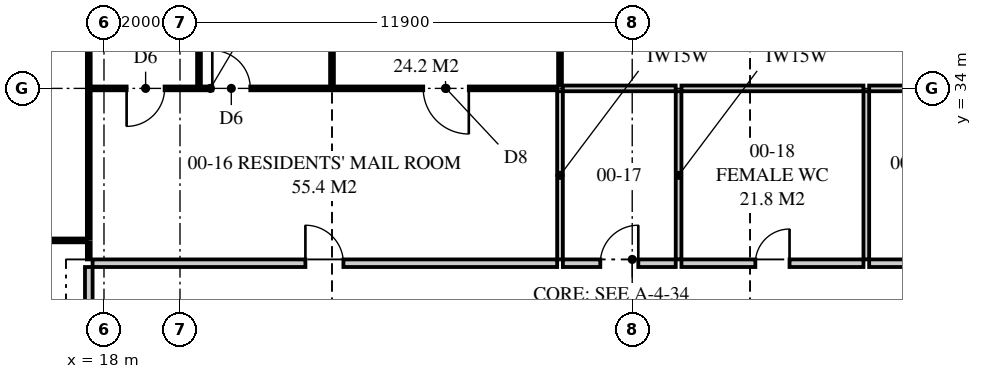
"""IFC4 building model, lengths in metres.
Left out: names, types, materials, properties, quantities, classifications, styles, units other than length and angle.
Written with IfcOpenShell. Run it as: python <this file> out.ifc"""

import sys

from ifc_helpers import new_model, si_unit, direction, frame, frame_2d, origin, place, context, subcontext, project, spatial, polyline, rectangle, outline, extrude, element, fill, save


model = new_model("IFC4")
c1 = context("Model", 3, precision=1e-05, world=origin(), true_north=direction((0.0, 1.0)))
c2 = subcontext(c1, "Body", "Model", "MODEL_VIEW")
j1 = project(units=[si_unit("LENGTHUNIT", "METRE"), si_unit("PLANEANGLEUNIT", "RADIAN")], contexts=[c1])
p1 = place(None, origin())
s1 = spatial("IfcSite", under=j1, at=p1, CompositionType="ELEMENT")
p2 = place(p1, origin())
s2 = spatial("IfcBuilding", under=s1, at=p2, CompositionType="ELEMENT")
p3 = place(p2, origin())
s3 = spatial("IfcBuildingStorey", under=s2, at=p3, CompositionType="ELEMENT", Elevation=0.0)
p4 = place(p3, frame((9.55, 30.0, 0.0), z_axis=(0.0, 0.0, 1.0), x_axis=(1.0, 0.0, 0.0)))
e1 = element("IfcWall", 1, at=p4, inside=s3, PredefinedType="PARTITIONING", context=c2, shape_type="SweptSolid", body=[
    extrude(outline(polyline([(0.0, 0.0), (8.0, 0.0), (8.0, 5.72), (4.71, 5.72), (4.71, 5.12), (2.19, 5.12), (2.19, 5.72), (0.0, 5.72), (0.0, 0.0)])), frame((0.0, 0.05, 0.0), z_axis=(0.0, -1.0, 0.0), x_axis=(1.0, 0.0, 0.0)), (0.0, 0.0, 1.0), 0.1),
])
p5 = place(p4, frame((3.5, 0.0, 0.0)))
e2 = element("IfcOpeningElement", 2, at=p5, cuts=e1, PredefinedType="OPENING", context=c2, shape_type="SweptSolid", body=[
    extrude(rectangle(XDim=1.2, YDim=2.2, at=frame_2d((0.6, 1.1))), frame((0.0, 0.06, 0.0), z_axis=(0.0, -1.0, 0.0), x_axis=(1.0, 0.0, 0.0)), (0.0, 0.0, 1.0), 0.12),
])
p6 = place(p3, frame((17.6, 27.75, 0.0), z_axis=(0.0, 0.0, 1.0), x_axis=(0.0, 1.0, 0.0)))
e3 = element("IfcWall", 3, at=p6, inside=s3, PredefinedType="PARTITIONING", context=c2, shape_type="SweptSolid", body=[
    extrude(rectangle(XDim=1.55, YDim=0.2, at=frame_2d((0.775, 0.0))), origin(), (0.0, 0.0, 1.0), 5.72),
])
p7 = place(p3, frame((17.6, 29.5, 0.0), z_axis=(0.0, 0.0, 1.0), x_axis=(0.0, 1.0, 0.0)))
e4 = element("IfcWall", 4, at=p7, inside=s3, PredefinedType="PARTITIONING", context=c2, shape_type="SweptSolid", body=[
    extrude(rectangle(XDim=0.45, YDim=0.1, at=frame_2d((0.225, 0.0))), origin(), (0.0, 0.0, 1.0), 5.72),
])
p8 = place(p3, frame((17.6, 30.05, 0.0), z_axis=(0.0, 0.0, 1.0), x_axis=(0.0, 1.0, 0.0)))
e5 = element("IfcWall", 5, at=p8, inside=s3, PredefinedType="PARTITIONING", context=c2, shape_type="SweptSolid", body=[
    extrude(rectangle(XDim=3.9, YDim=0.1, at=frame_2d((1.95, 0.0))), origin(), (0.0, 0.0, 1.0), 5.72),
])
p9 = place(p3, frame((17.6, 34.05, 0.0), z_axis=(0.0, 0.0, 1.0), x_axis=(0.0, 1.0, 0.0)))
e6 = element("IfcWall", 6, at=p9, inside=s3, PredefinedType="PARTITIONING", context=c2, shape_type="SweptSolid", body=[
    extrude(outline(polyline([(0.0, 0.0), (1.9, 0.0), (1.9, 5.72), (1.9, 5.12), (1.74, 5.12), (1.74, 5.72), (0.0, 5.72), (0.0, 0.0)])), frame((0.0, 0.05, 0.0), z_axis=(0.0, -1.0, 0.0), x_axis=(1.0, 0.0, 0.0)), (0.0, 0.0, 1.0), 0.1),
])
p10 = place(p3, frame((17.7, 29.4, 0.0), z_axis=(0.0, 0.0, 1.0), x_axis=(1.0, 0.0, 0.0)))
e7 = element("IfcWall", 7, at=p10, inside=s3, PredefinedType="PARTITIONING", context=c2, shape_type="SweptSolid", body=[
    extrude(outline(polyline([(0.0, 0.0), (12.225, 0.0), (12.225, 5.72), (7.61, 5.72), (7.61, 5.12), (4.99, 5.12), (4.99, 5.72), (0.0, 5.72), (0.0, 0.0)])), frame((0.0, 0.1, 0.0), z_axis=(0.0, -1.0, 0.0), x_axis=(1.0, 0.0, 0.0)), (0.0, 0.0, 1.0), 0.2),
])
p11 = place(p10, frame((5.6, 0.0, 0.0)))
e8 = element("IfcOpeningElement", 8, at=p11, cuts=e7, PredefinedType="OPENING", context=c2, shape_type="SweptSolid", body=[
    extrude(rectangle(XDim=1.0, YDim=2.1, at=frame_2d((0.5, 1.05))), frame((0.0, 0.11, 0.0), z_axis=(0.0, -1.0, 0.0), x_axis=(1.0, 0.0, 0.0)), (0.0, 0.0, 1.0), 0.22),
])
p12 = place(p3, frame((30.075, 29.4, 0.0), z_axis=(0.0, 0.0, 1.0), x_axis=(1.0, 0.0, 0.0)))
e9 = element("IfcWall", 9, at=p12, inside=s3, PredefinedType="PARTITIONING", context=c2, shape_type="SweptSolid", body=[
    extrude(rectangle(XDim=2.97, YDim=0.2, at=frame_2d((1.485, 0.0))), origin(), (0.0, 0.0, 1.0), 5.72),
])
p13 = place(p12, frame((0.985, 0.0, 0.0)))
e10 = element("IfcOpeningElement", 10, at=p13, cuts=e9, PredefinedType="OPENING", context=c2, shape_type="SweptSolid", body=[
    extrude(rectangle(XDim=1.0, YDim=2.1, at=frame_2d((0.5, 1.05))), frame((0.0, 0.11, 0.0), z_axis=(0.0, -1.0, 0.0), x_axis=(1.0, 0.0, 0.0)), (0.0, 0.0, 1.0), 0.22),
])
p14 = place(p3, frame((33.195, 29.4, 0.0), z_axis=(0.0, 0.0, 1.0), x_axis=(1.0, 0.0, 0.0)))
e11 = element("IfcWall", 11, at=p14, inside=s3, PredefinedType="PARTITIONING", context=c2, shape_type="SweptSolid", body=[
    extrude(outline(polyline([(0.0, 0.0), (4.79, 0.0), (4.79, 5.72), (3.115, 5.72), (3.115, 5.12), (0.495, 5.12), (0.495, 5.72), (0.0, 5.72), (0.0, 0.0)])), frame((0.0, 0.1, 0.0), z_axis=(0.0, -1.0, 0.0), x_axis=(1.0, 0.0, 0.0)), (0.0, 0.0, 1.0), 0.2),
])
p15 = place(p14, frame((1.945, 0.0, 0.0)))
e12 = element("IfcOpeningElement", 12, at=p15, cuts=e11, PredefinedType="OPENING", context=c2, shape_type="SweptSolid", body=[
    extrude(rectangle(XDim=0.9, YDim=2.1, at=frame_2d((0.45, 1.05))), frame((0.0, 0.11, 0.0), z_axis=(0.0, -1.0, 0.0), x_axis=(1.0, 0.0, 0.0)), (0.0, 0.0, 1.0), 0.22),
])
p16 = place(p3, frame((38.135, 29.4, 0.0), z_axis=(0.0, 0.0, 1.0), x_axis=(1.0, 0.0, 0.0)))
e13 = element("IfcWall", 13, at=p16, inside=s3, PredefinedType="PARTITIONING", context=c2, shape_type="SweptSolid", body=[
    extrude(outline(polyline([(0.0, 0.0), (4.79, 0.0), (4.79, 5.72), (4.79, 5.12), (3.924, 5.12), (3.924, 5.72), (0.0, 5.72), (0.0, 0.0)])), frame((0.0, 0.1, 0.0), z_axis=(0.0, -1.0, 0.0), x_axis=(1.0, 0.0, 0.0)), (0.0, 0.0, 1.0), 0.2),
])
p17 = place(p16, frame((1.945, 0.0, 0.0)))
e14 = element("IfcOpeningElement", 14, at=p17, cuts=e13, PredefinedType="OPENING", context=c2, shape_type="SweptSolid", body=[
    extrude(rectangle(XDim=0.9, YDim=2.1, at=frame_2d((0.45, 1.05))), frame((0.0, 0.11, 0.0), z_axis=(0.0, -1.0, 0.0), x_axis=(1.0, 0.0, 0.0)), (0.0, 0.0, 1.0), 0.22),
])
p18 = place(p3, frame((30.0, 29.5, 0.0), z_axis=(0.0, 0.0, 1.0), x_axis=(0.0, 1.0, 0.0)))
e15 = element("IfcWall", 15, at=p18, inside=s3, PredefinedType="PLUMBINGWALL", context=c2, shape_type="SweptSolid", body=[
    extrude(rectangle(XDim=4.425, YDim=0.15, at=frame_2d((2.212, 0.0))), origin(), (0.0, 0.0, 1.0), 5.72),
])
p19 = place(p3, frame((17.65, 34.0, 0.0), z_axis=(0.0, 0.0, 1.0), x_axis=(1.0, 0.0, 0.0)))
e16 = element("IfcWall", 16, at=p19, inside=s3, PredefinedType="PARTITIONING", context=c2, shape_type="SweptSolid", body=[
    extrude(outline(polyline([(0.0, 0.0), (6.3, 0.0), (6.3, 5.72), (6.3, 5.12), (5.09, 5.12), (5.09, 5.72), (0.0, 5.72), (0.0, 0.0)])), frame((0.0, 0.05, 0.0), z_axis=(0.0, -1.0, 0.0), x_axis=(1.0, 0.0, 0.0)), (0.0, 0.0, 1.0), 0.1),
])
p20 = place(p19, frame((3.2, 0.0, 0.0)))
e17 = element("IfcOpeningElement", 17, at=p20, cuts=e16, PredefinedType="OPENING", context=c2, shape_type="SweptSolid", body=[
    extrude(rectangle(XDim=1.0, YDim=2.1, at=frame_2d((0.5, 1.05))), frame((0.0, 0.06, 0.0), z_axis=(0.0, -1.0, 0.0), x_axis=(1.0, 0.0, 0.0)), (0.0, 0.0, 1.0), 0.12),
])
p21 = place(p19, frame((0.946, 0.0, 0.0)))
e18 = element("IfcOpeningElement", 18, at=p21, cuts=e16, PredefinedType="OPENING", context=c2, shape_type="SweptSolid", body=[
    extrude(rectangle(XDim=1.0, YDim=2.1, at=frame_2d((0.5, 1.05))), frame((0.0, 0.06, 0.0), z_axis=(0.0, -1.0, 0.0), x_axis=(1.0, 0.0, 0.0)), (0.0, 0.0, 1.0), 0.12),
])
p22 = place(p3, frame((24.05, 34.0, 0.0), z_axis=(0.0, 0.0, 1.0), x_axis=(1.0, 0.0, 0.0)))
e19 = element("IfcWall", 19, at=p22, inside=s3, PredefinedType="PARTITIONING", context=c2, shape_type="SweptSolid", body=[
    extrude(outline(polyline([(0.0, 0.0), (5.875, 0.0), (5.875, 5.72), (1.21, 5.72), (1.21, 5.12), (0.0, 5.12), (0.0, 5.72), (0.0, 0.0)])), frame((0.0, 0.05, 0.0), z_axis=(0.0, -1.0, 0.0), x_axis=(1.0, 0.0, 0.0)), (0.0, 0.0, 1.0), 0.1),
])
p23 = place(p22, frame((2.35, 0.0, 0.0)))
e20 = element("IfcOpeningElement", 20, at=p23, cuts=e19, PredefinedType="OPENING", context=c2, shape_type="SweptSolid", body=[
    extrude(rectangle(XDim=1.2, YDim=2.4, at=frame_2d((0.6, 1.2))), frame((0.0, 0.06, 0.0), z_axis=(0.0, -1.0, 0.0), x_axis=(1.0, 0.0, 0.0)), (0.0, 0.0, 1.0), 0.12),
])
p24 = place(p3, frame((33.12, 29.5, 0.0), z_axis=(0.0, 0.0, 1.0), x_axis=(0.0, 1.0, 0.0)))
e21 = element("IfcWall", 21, at=p24, inside=s3, PredefinedType="PLUMBINGWALL", context=c2, shape_type="SweptSolid", body=[
    extrude(rectangle(XDim=4.425, YDim=0.15, at=frame_2d((2.212, 0.0))), origin(), (0.0, 0.0, 1.0), 5.72),
])
p25 = place(p3, frame((30.075, 34.0, 0.0), z_axis=(0.0, 0.0, 1.0), x_axis=(1.0, 0.0, 0.0)))
e22 = element("IfcWall", 22, at=p25, inside=s3, PredefinedType="PLUMBINGWALL", context=c2, shape_type="SweptSolid", body=[
    extrude(rectangle(XDim=2.97, YDim=0.15, at=frame_2d((1.485, 0.0))), origin(), (0.0, 0.0, 1.0), 5.72),
])
p26 = place(p3, frame((38.06, 29.5, 0.0), z_axis=(0.0, 0.0, 1.0), x_axis=(0.0, 1.0, 0.0)))
e23 = element("IfcWall", 23, at=p26, inside=s3, PredefinedType="PLUMBINGWALL", context=c2, shape_type="SweptSolid", body=[
    extrude(rectangle(XDim=4.425, YDim=0.15, at=frame_2d((2.212, 0.0))), origin(), (0.0, 0.0, 1.0), 5.72),
])
p27 = place(p3, frame((33.195, 34.0, 0.0), z_axis=(0.0, 0.0, 1.0), x_axis=(1.0, 0.0, 0.0)))
e24 = element("IfcWall", 24, at=p27, inside=s3, PredefinedType="PLUMBINGWALL", context=c2, shape_type="SweptSolid", body=[
    extrude(outline(polyline([(0.0, 0.0), (4.79, 0.0), (4.79, 5.72), (3.09, 5.72), (3.09, 5.12), (0.52, 5.12), (0.52, 5.72), (0.0, 5.72), (0.0, 0.0)])), frame((0.0, 0.075, 0.0), z_axis=(0.0, -1.0, 0.0), x_axis=(1.0, 0.0, 0.0)), (0.0, 0.0, 1.0), 0.15),
])
p28 = place(p3, frame((38.135, 34.0, 0.0), z_axis=(0.0, 0.0, 1.0), x_axis=(1.0, 0.0, 0.0)))
e25 = element("IfcWall", 25, at=p28, inside=s3, PredefinedType="PLUMBINGWALL", context=c2, shape_type="SweptSolid", body=[
    extrude(outline(polyline([(0.0, 0.0), (4.79, 0.0), (4.79, 5.72), (4.79, 5.12), (3.948, 5.12), (3.948, 5.72), (0.0, 5.72), (0.0, 0.0)])), frame((0.0, 0.075, 0.0), z_axis=(0.0, -1.0, 0.0), x_axis=(1.0, 0.0, 0.0)), (0.0, 0.0, 1.0), 0.15),
])
p29 = place(p3, frame((24.0, 34.05, 0.0), z_axis=(0.0, 0.0, 1.0), x_axis=(0.0, 1.0, 0.0)))
e26 = element("IfcWall", 26, at=p29, inside=s3, PredefinedType="PARTITIONING", context=c2, shape_type="SweptSolid", body=[
    extrude(outline(polyline([(0.0, 0.0), (4.1, 0.0), (4.1, 5.72), (4.1, 5.12), (3.06, 5.12), (0.0, 5.12), (0.0, 5.72), (0.0, 0.0)])), frame((0.0, 0.05, 0.0), z_axis=(0.0, -1.0, 0.0), x_axis=(1.0, 0.0, 0.0)), (0.0, 0.0, 1.0), 0.1),
])
p30 = place(p3, frame((30.0, 34.075, 0.0), z_axis=(0.0, 0.0, 1.0), x_axis=(0.0, 1.0, 0.0)))
e27 = element("IfcWall", 27, at=p30, inside=s3, PredefinedType="PARTITIONING", context=c2, shape_type="SweptSolid", body=[
    extrude(outline(polyline([(0.0, 0.0), (2.975, 0.0), (2.975, 5.12), (1.715, 5.12), (1.715, 5.72), (0.0, 5.72), (0.0, 0.0)])), frame((0.0, 0.05, 0.0), z_axis=(0.0, -1.0, 0.0), x_axis=(1.0, 0.0, 0.0)), (0.0, 0.0, 1.0), 0.1),
])
p31 = place(p30, frame((1.425, 0.0, 0.0)))
e28 = element("IfcOpeningElement", 28, at=p31, cuts=e27, PredefinedType="OPENING", context=c2, shape_type="SweptSolid", body=[
    extrude(rectangle(XDim=1.2, YDim=2.4, at=frame_2d((0.6, 1.2))), frame((0.0, 0.06, 0.0), z_axis=(0.0, -1.0, 0.0), x_axis=(1.0, 0.0, 0.0)), (0.0, 0.0, 1.0), 0.12),
])
p32 = place(p3, frame((20.5, 34.04, 0.0), z_axis=(0.0, 0.0, 1.0), x_axis=(0.0, 1.0, 0.0)))
e29 = element("IfcWall", 29, at=p32, inside=s3, PredefinedType="PARTITIONING", context=c2, shape_type="SweptSolid", body=[
    extrude(outline(polyline([(0.0, 0.0), (3.01, 0.0), (3.01, 5.12), (1.75, 5.12), (1.75, 5.72), (0.0, 5.72), (0.0, 0.0)])), frame((0.0, 0.05, 0.0), z_axis=(0.0, -1.0, 0.0), x_axis=(1.0, 0.0, 0.0)), (0.0, 0.0, 1.0), 0.1),
])
p33 = place(p11, origin())
e30 = element("IfcDoor", 30, at=p33, inside=s3, OperationType="SINGLE_SWING_LEFT", PredefinedType="DOOR", context=c2, shape_type="SweptSolid", body=[
    extrude(rectangle(XDim=1.0, YDim=2.1, at=frame_2d((0.5, 1.05))), frame((0.0, 0.025, 0.0), z_axis=(0.0, -1.0, 0.0), x_axis=(1.0, 0.0, 0.0)), (0.0, 0.0, 1.0), 0.05),
])
fill(e8, e30)
p34 = place(p13, origin())
e31 = element("IfcDoor", 31, at=p34, inside=s3, OperationType="SINGLE_SWING_RIGHT", PredefinedType="DOOR", context=c2, shape_type="SweptSolid", body=[
    extrude(rectangle(XDim=1.0, YDim=2.1, at=frame_2d((0.5, 1.05))), frame((0.0, 0.025, 0.0), z_axis=(0.0, -1.0, 0.0), x_axis=(1.0, 0.0, 0.0)), (0.0, 0.0, 1.0), 0.05),
])
fill(e10, e31)
p35 = place(p15, origin())
e32 = element("IfcDoor", 32, at=p35, inside=s3, OperationType="SINGLE_SWING_RIGHT", PredefinedType="DOOR", context=c2, shape_type="SweptSolid", body=[
    extrude(rectangle(XDim=0.9, YDim=2.1, at=frame_2d((0.45, 1.05))), frame((0.0, 0.025, 0.0), z_axis=(0.0, -1.0, 0.0), x_axis=(1.0, 0.0, 0.0)), (0.0, 0.0, 1.0), 0.05),
])
fill(e12, e32)
p36 = place(p20, origin())
e33 = element("IfcDoor", 33, at=p36, inside=s3, OperationType="SINGLE_SWING_LEFT", PredefinedType="DOOR", context=c2, shape_type="SweptSolid", body=[
    extrude(rectangle(XDim=1.0, YDim=2.1, at=frame_2d((0.5, 1.05))), frame((0.0, 0.025, 0.0), z_axis=(0.0, -1.0, 0.0), x_axis=(1.0, 0.0, 0.0)), (0.0, 0.0, 1.0), 0.05),
])
fill(e17, e33)
p37 = place(p23, frame((1.2, 0.0, 0.0), z_axis=(0.0, 0.0, 1.0), x_axis=(-1.0, 0.0, 0.0)))
e34 = element("IfcDoor", 34, at=p37, inside=s3, OperationType="SINGLE_SWING_LEFT", PredefinedType="DOOR", context=c2, shape_type="SweptSolid", body=[
    extrude(rectangle(XDim=1.2, YDim=2.4, at=frame_2d((0.6, 1.2))), frame((0.0, 0.025, 0.0), z_axis=(0.0, -1.0, 0.0), x_axis=(1.0, 0.0, 0.0)), (0.0, 0.0, 1.0), 0.05),
])
fill(e20, e34)
p38 = place(p21, frame((1.0, 0.0, 0.0), z_axis=(0.0, 0.0, 1.0), x_axis=(-1.0, 0.0, 0.0)))
e35 = element("IfcDoor", 35, at=p38, inside=s3, OperationType="SINGLE_SWING_RIGHT", PredefinedType="DOOR", context=c2, shape_type="SweptSolid", body=[
    extrude(rectangle(XDim=1.0, YDim=2.1, at=frame_2d((0.5, 1.05))), frame((0.0, 0.025, 0.0), z_axis=(0.0, -1.0, 0.0), x_axis=(1.0, 0.0, 0.0)), (0.0, 0.0, 1.0), 0.05),
])
fill(e18, e35)
save(model, sys.argv[1])
